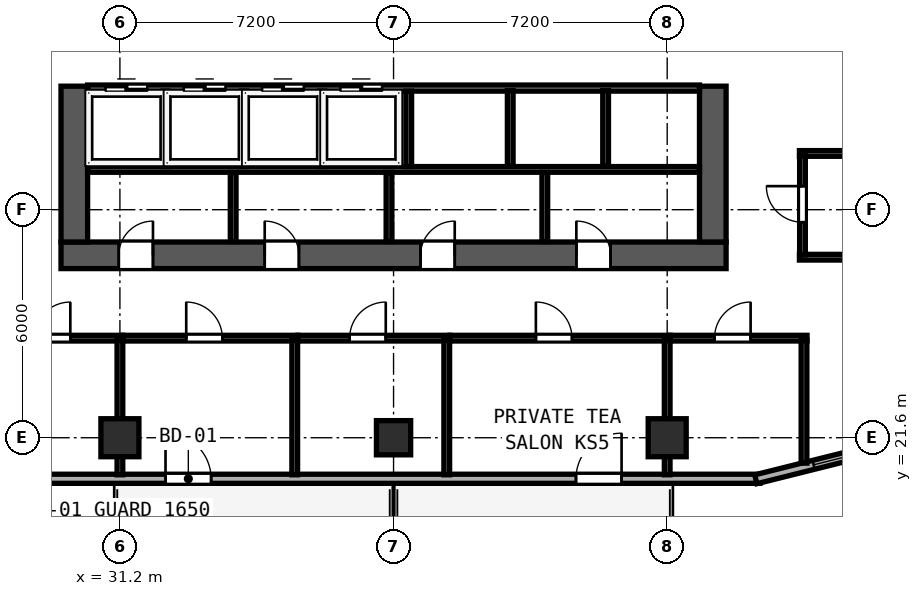
"""IFC4 building model, lengths in metres.
Left out: names, types, materials, properties, quantities, classifications, styles, units other than length and angle.
Written with IfcOpenShell. Run it as: python <this file> out.ifc"""

import sys

from ifc_helpers import new_model, si_unit, direction, frame, frame_2d, origin, origin_2d, place, context, subcontext, project, spatial, rectangle, hollow_rectangle, extrude, element, fill, save


model = new_model("IFC4")
c1 = context("Model", 3, precision=1e-05, world=origin(), true_north=direction((0.0, 1.0)))
c2 = subcontext(c1, "Body", "Model", "MODEL_VIEW")
j1 = project(units=[si_unit("LENGTHUNIT", "METRE"), si_unit("PLANEANGLEUNIT", "RADIAN")], contexts=[c1])
p1 = place(None, origin())
s1 = spatial("IfcSite", under=j1, at=p1, CompositionType="ELEMENT")
p2 = place(p1, origin())
s2 = spatial("IfcBuilding", under=s1, at=p2, CompositionType="ELEMENT")
p3 = place(p2, frame((0.0, 0.0, 121.2)))
s3 = spatial("IfcBuildingStorey", under=s2, at=p3, CompositionType="ELEMENT", Elevation=121.2)
p4 = place(p3, frame((29.65, 26.4, 0.0), z_axis=(0.0, 0.0, 1.0), x_axis=(1.0, 0.0, 0.0)))
e1 = element("IfcWall", 1, at=p4, inside=s3, PredefinedType="SHEAR", context=c2, shape_type="SweptSolid", body=[
    extrude(rectangle(XDim=17.5, YDim=0.7, at=frame_2d((8.75, 0.0))), origin(), (0.0, 0.0, 1.0), 3.6),
])
p5 = place(p4, frame((2.42, 0.0, 0.0), z_axis=(0.0, 0.0, 1.0), x_axis=(-1.0, 0.0, 0.0)))
e2 = element("IfcOpeningElement", 2, at=p5, cuts=e1, PredefinedType="OPENING", context=c2, shape_type="SweptSolid", body=[
    extrude(rectangle(XDim=0.9, YDim=2.1, at=frame_2d((0.45, 1.05))), frame((0.0, 0.36, 0.0), z_axis=(0.0, -1.0, 0.0), x_axis=(1.0, 0.0, 0.0)), (0.0, 0.0, 1.0), 0.72),
])
p6 = place(p4, frame((6.26, 0.0, 0.0), z_axis=(0.0, 0.0, 1.0), x_axis=(-1.0, 0.0, 0.0)))
e3 = element("IfcOpeningElement", 3, at=p6, cuts=e1, PredefinedType="OPENING", context=c2, shape_type="SweptSolid", body=[
    extrude(rectangle(XDim=0.9, YDim=2.1, at=frame_2d((0.45, 1.05))), frame((0.0, 0.36, 0.0), z_axis=(0.0, -1.0, 0.0), x_axis=(1.0, 0.0, 0.0)), (0.0, 0.0, 1.0), 0.72),
])
p7 = place(p4, frame((10.36, 0.0, 0.0), z_axis=(0.0, 0.0, 1.0), x_axis=(-1.0, 0.0, 0.0)))
e4 = element("IfcOpeningElement", 4, at=p7, cuts=e1, PredefinedType="OPENING", context=c2, shape_type="SweptSolid", body=[
    extrude(rectangle(XDim=0.9, YDim=2.1, at=frame_2d((0.45, 1.05))), frame((0.0, 0.36, 0.0), z_axis=(0.0, -1.0, 0.0), x_axis=(1.0, 0.0, 0.0)), (0.0, 0.0, 1.0), 0.72),
])
p8 = place(p4, frame((14.46, 0.0, 0.0), z_axis=(0.0, 0.0, 1.0), x_axis=(-1.0, 0.0, 0.0)))
e5 = element("IfcOpeningElement", 5, at=p8, cuts=e1, PredefinedType="OPENING", context=c2, shape_type="SweptSolid", body=[
    extrude(rectangle(XDim=0.9, YDim=2.1, at=frame_2d((0.45, 1.05))), frame((0.0, 0.36, 0.0), z_axis=(0.0, -1.0, 0.0), x_axis=(1.0, 0.0, 0.0)), (0.0, 0.0, 1.0), 0.72),
])
for number, where, z_axis, x_axis in (
    (6, (30.0, 26.75, 0.0), (0.0, 0.0, 1.0), (0.0, 1.0, 0.0)),
    (7, (46.8, 26.75, 0.0), (0.0, 0.0, 1.0), (0.0, 1.0, 0.0)),
):
    element("IfcWall", number, at=place(p3, frame(where, z_axis=z_axis, x_axis=x_axis)), inside=s3, PredefinedType="SHEAR", context=c2, shape_type="SweptSolid", body=[
        extrude(rectangle(XDim=4.1, YDim=0.7, at=frame_2d((2.05, 0.0))), origin(), (0.0, 0.0, 1.0), 3.6),
    ])
for number, where, z_axis, x_axis in (
    (8, (31.2, 21.6, 0.0), (0.0, 0.0, 1.0), (1.0, 0.0, 0.0)),
    (9, (45.6, 21.6, 0.0), (0.0, 0.0, 1.0), (1.0, 0.0, 0.0)),
):
    element("IfcColumn", number, at=place(p3, frame(where, z_axis=z_axis, x_axis=x_axis)), inside=s3, PredefinedType="COLUMN", context=c2, shape_type="SweptSolid", body=[
        extrude(hollow_rectangle(XDim=1.0, YDim=1.0, WallThickness=0.038, at=origin_2d()), origin(), (0.0, 0.0, 1.0), 3.8),
    ])
p9 = place(p3, frame((38.4, 21.6, 0.0), z_axis=(0.0, 0.0, 1.0), x_axis=(1.0, 0.0, 0.0)))
e10 = element("IfcColumn", 10, at=p9, inside=s3, PredefinedType="COLUMN", context=c2, shape_type="SweptSolid", body=[
    extrude(hollow_rectangle(XDim=0.9, YDim=0.9, WallThickness=0.034, at=origin_2d()), origin(), (0.0, 0.0, 1.0), 3.8),
])
p10 = place(p3, frame((28.76, 20.52, 0.0), z_axis=(0.0, 0.0, 1.0), x_axis=(1.0, 0.0, 0.0)))
e11 = element("IfcWall", 11, at=p10, inside=s3, PredefinedType="SOLIDWALL", context=c2, shape_type="SweptSolid", body=[
    extrude(rectangle(XDim=19.281, YDim=0.24, at=frame_2d((9.64, 0.0))), origin(), (0.0, 0.0, 1.0), 3.6),
])
p11 = place(p10, frame((4.84, 0.0, 0.0), z_axis=(0.0, 0.0, 1.0), x_axis=(-1.0, 0.0, 0.0)))
e12 = element("IfcOpeningElement", 12, at=p11, cuts=e11, PredefinedType="OPENING", context=c2, shape_type="SweptSolid", body=[
    extrude(rectangle(XDim=1.2, YDim=2.15, at=frame_2d((0.6, 1.075))), frame((0.0, 0.13, 0.0), z_axis=(0.0, -1.0, 0.0), x_axis=(1.0, 0.0, 0.0)), (0.0, 0.0, 1.0), 0.26),
])
p12 = place(p10, frame((15.64, 0.0, 0.0), z_axis=(0.0, 0.0, 1.0), x_axis=(-1.0, 0.0, 0.0)))
e13 = element("IfcOpeningElement", 13, at=p12, cuts=e11, PredefinedType="OPENING", context=c2, shape_type="SweptSolid", body=[
    extrude(rectangle(XDim=1.2, YDim=2.15, at=frame_2d((0.6, 1.075))), frame((0.0, 0.13, 0.0), z_axis=(0.0, -1.0, 0.0), x_axis=(1.0, 0.0, 0.0)), (0.0, 0.0, 1.0), 0.26),
])
p13 = place(p3, frame((47.932, 20.507, 0.0), z_axis=(0.0, 0.0, 1.0), x_axis=(0.970145683738, 0.242522890311, 0.0)))
e14 = element("IfcWall", 14, at=p13, inside=s3, PredefinedType="SOLIDWALL", context=c2, shape_type="SweptSolid", body=[
    extrude(rectangle(XDim=4.511, YDim=0.24, at=frame_2d((2.255, 0.0))), origin(), (0.0, 0.0, 1.0), 3.145),
])
p14 = place(p13, frame((1.569, 0.0, 0.85)))
e15 = element("IfcOpeningElement", 15, at=p14, cuts=e14, PredefinedType="OPENING", context=c2, shape_type="SweptSolid", body=[
    extrude(rectangle(XDim=1.15, YDim=1.8, at=frame_2d((0.575, 0.9))), frame((0.0, 0.13, 0.0), z_axis=(0.0, -1.0, 0.0), x_axis=(1.0, 0.0, 0.0)), (0.0, 0.0, 1.0), 0.26),
])
p15 = place(p3, frame((30.35, 30.8, 0.0), z_axis=(0.0, 0.0, 1.0), x_axis=(1.0, 0.0, 0.0)))
e16 = element("IfcWall", 16, at=p15, inside=s3, PredefinedType="SOLIDWALL", context=c2, shape_type="SweptSolid", body=[
    extrude(rectangle(XDim=16.1, YDim=0.16, at=frame_2d((8.05, 0.0))), origin(), (0.0, 0.0, 1.0), 3.6),
])
p16 = place(p15, frame((0.47, 0.0, 0.0)))
e17 = element("IfcOpeningElement", 17, at=p16, cuts=e16, PredefinedType="OPENING", context=c2, shape_type="SweptSolid", body=[
    extrude(rectangle(XDim=1.1, YDim=2.2, at=frame_2d((0.55, 1.1))), frame((0.0, 0.09, 0.0), z_axis=(0.0, -1.0, 0.0), x_axis=(1.0, 0.0, 0.0)), (0.0, 0.0, 1.0), 0.18),
])
p17 = place(p15, frame((2.53, 0.0, 0.0)))
e18 = element("IfcOpeningElement", 18, at=p17, cuts=e16, PredefinedType="OPENING", context=c2, shape_type="SweptSolid", body=[
    extrude(rectangle(XDim=1.1, YDim=2.2, at=frame_2d((0.55, 1.1))), frame((0.0, 0.09, 0.0), z_axis=(0.0, -1.0, 0.0), x_axis=(1.0, 0.0, 0.0)), (0.0, 0.0, 1.0), 0.18),
])
p18 = place(p15, frame((4.59, 0.0, 0.0)))
e19 = element("IfcOpeningElement", 19, at=p18, cuts=e16, PredefinedType="OPENING", context=c2, shape_type="SweptSolid", body=[
    extrude(rectangle(XDim=1.1, YDim=2.2, at=frame_2d((0.55, 1.1))), frame((0.0, 0.09, 0.0), z_axis=(0.0, -1.0, 0.0), x_axis=(1.0, 0.0, 0.0)), (0.0, 0.0, 1.0), 0.18),
])
p19 = place(p15, frame((6.65, 0.0, 0.0)))
e20 = element("IfcOpeningElement", 20, at=p19, cuts=e16, PredefinedType="OPENING", context=c2, shape_type="SweptSolid", body=[
    extrude(rectangle(XDim=1.1, YDim=2.2, at=frame_2d((0.55, 1.1))), frame((0.0, 0.09, 0.0), z_axis=(0.0, -1.0, 0.0), x_axis=(1.0, 0.0, 0.0)), (0.0, 0.0, 1.0), 0.18),
])
p20 = place(p3, frame((30.35, 28.66, 0.0), z_axis=(0.0, 0.0, 1.0), x_axis=(1.0, 0.0, 0.0)))
e21 = element("IfcWall", 21, at=p20, inside=s3, PredefinedType="PARTITIONING", context=c2, shape_type="SweptSolid", body=[
    extrude(rectangle(XDim=16.1, YDim=0.15, at=frame_2d((8.05, 0.0))), origin(), (0.0, 0.0, 1.0), 3.6),
])
for number, where, z_axis, x_axis in (
    (22, (32.4, 28.735, 0.0), (0.0, 0.0, 1.0), (0.0, 1.0, 0.0)),
    (23, (34.46, 28.735, 0.0), (0.0, 0.0, 1.0), (0.0, 1.0, 0.0)),
    (24, (36.52, 28.735, 0.0), (0.0, 0.0, 1.0), (0.0, 1.0, 0.0)),
    (25, (38.8, 28.735, 0.0), (0.0, 0.0, 1.0), (0.0, 1.0, 0.0)),
):
    element("IfcWall", number, at=place(p3, frame(where, z_axis=z_axis, x_axis=x_axis)), inside=s3, PredefinedType="SOLIDWALL", context=c2, shape_type="SweptSolid", body=[
        extrude(rectangle(XDim=1.985, YDim=0.15, at=frame_2d((0.992, 0.0))), origin(), (0.0, 0.0, 1.0), 3.6),
    ])
for number, where, z_axis, x_axis in (
    (26, (34.18, 26.76, 0.0), (0.0, 0.0, 1.0), (0.0, 1.0, 0.0)),
    (27, (38.28, 26.76, 0.0), (0.0, 0.0, 1.0), (0.0, 1.0, 0.0)),
    (28, (42.38, 26.76, 0.0), (0.0, 0.0, 1.0), (0.0, 1.0, 0.0)),
):
    element("IfcWall", number, at=place(p3, frame(where, z_axis=z_axis, x_axis=x_axis)), inside=s3, PredefinedType="PARTITIONING", context=c2, shape_type="SweptSolid", body=[
        extrude(rectangle(XDim=1.82, YDim=0.15, at=frame_2d((0.91, 0.0))), origin(), (0.0, 0.0, 1.0), 3.6),
    ])
for number, where, z_axis, x_axis in (
    (29, (41.47, 28.75, 0.0), (0.0, 0.0, 1.0), (0.0, 1.0, 0.0)),
    (30, (43.98, 28.75, 0.0), (0.0, 0.0, 1.0), (0.0, 1.0, 0.0)),
):
    element("IfcWall", number, at=place(p3, frame(where, z_axis=z_axis, x_axis=x_axis)), inside=s3, PredefinedType="SOLIDWALL", context=c2, shape_type="SweptSolid", body=[
        extrude(rectangle(XDim=1.985, YDim=0.15, at=frame_2d((0.993, 0.0))), origin(), (0.0, 0.0, 1.0), 3.6),
    ])
for number, where, z_axis, x_axis in (
    (31, (49.08, 29.08, 0.0), (0.0, 0.0, 1.0), (1.0, 0.0, 0.0)),
    (32, (49.08, 26.35, 0.0), (0.0, 0.0, 1.0), (1.0, 0.0, 0.0)),
):
    element("IfcWall", number, at=place(p3, frame(where, z_axis=z_axis, x_axis=x_axis)), inside=s3, PredefinedType="PARTITIONING", context=c2, shape_type="SweptSolid", body=[
        extrude(rectangle(XDim=3.8, YDim=0.15, at=frame_2d((1.9, 0.0))), origin(), (0.0, 0.0, 1.0), 3.6),
    ])
p21 = place(p3, frame((49.16, 26.41, 0.0), z_axis=(0.0, 0.0, 1.0), x_axis=(0.0, 1.0, 0.0)))
e33 = element("IfcWall", 33, at=p21, inside=s3, PredefinedType="PARTITIONING", context=c2, shape_type="SweptSolid", body=[
    extrude(rectangle(XDim=2.61, YDim=0.15, at=frame_2d((1.305, 0.0))), origin(), (0.0, 0.0, 1.0), 3.6),
])
p22 = place(p21, frame((0.86, 0.0, 0.0)))
e34 = element("IfcOpeningElement", 34, at=p22, cuts=e33, PredefinedType="OPENING", context=c2, shape_type="SweptSolid", body=[
    extrude(rectangle(XDim=0.95, YDim=2.12, at=frame_2d((0.475, 1.06))), frame((0.0, 0.085, 0.0), z_axis=(0.0, -1.0, 0.0), x_axis=(1.0, 0.0, 0.0)), (0.0, 0.0, 1.0), 0.17),
])
p23 = place(p3, frame((27.72, 24.22, 0.0), z_axis=(0.0, 0.0, 1.0), x_axis=(1.0, 0.0, 0.0)))
e35 = element("IfcWall", 35, at=p23, inside=s3, PredefinedType="PARTITIONING", context=c2, shape_type="SweptSolid", body=[
    extrude(rectangle(XDim=3.56, YDim=0.15, at=frame_2d((1.78, 0.0))), origin(), (0.0, 0.0, 1.0), 3.6),
])
p24 = place(p23, frame((2.175, 0.0, 0.0), z_axis=(0.0, 0.0, 1.0), x_axis=(-1.0, 0.0, 0.0)))
e36 = element("IfcOpeningElement", 36, at=p24, cuts=e35, PredefinedType="OPENING", context=c2, shape_type="SweptSolid", body=[
    extrude(rectangle(XDim=0.95, YDim=2.12, at=frame_2d((0.475, 1.06))), frame((0.0, 0.085, 0.0), z_axis=(0.0, -1.0, 0.0), x_axis=(1.0, 0.0, 0.0)), (0.0, 0.0, 1.0), 0.17),
])
p25 = place(p3, frame((31.2, 20.625, 0.0), z_axis=(0.0, 0.0, 1.0), x_axis=(0.0, 1.0, 0.0)))
e37 = element("IfcWall", 37, at=p25, inside=s3, PredefinedType="PARTITIONING", context=c2, shape_type="SweptSolid", body=[
    extrude(rectangle(XDim=3.535, YDim=0.15, at=frame_2d((1.768, 0.0))), origin(), (0.0, 0.0, 1.0), 3.085),
])
p26 = place(p3, frame((31.282, 24.22, 0.0), z_axis=(0.0, 0.0, 1.0), x_axis=(1.0, 0.0, 0.0)))
e38 = element("IfcWall", 38, at=p26, inside=s3, PredefinedType="PARTITIONING", context=c2, shape_type="SweptSolid", body=[
    extrude(rectangle(XDim=4.598, YDim=0.15, at=frame_2d((2.299, 0.0))), origin(), (0.0, 0.0, 1.0), 3.6),
])
p27 = place(p26, frame((2.613, 0.0, 0.0), z_axis=(0.0, 0.0, 1.0), x_axis=(-1.0, 0.0, 0.0)))
e39 = element("IfcOpeningElement", 39, at=p27, cuts=e38, PredefinedType="OPENING", context=c2, shape_type="SweptSolid", body=[
    extrude(rectangle(XDim=0.95, YDim=2.12, at=frame_2d((0.475, 1.06))), frame((0.0, 0.085, 0.0), z_axis=(0.0, -1.0, 0.0), x_axis=(1.0, 0.0, 0.0)), (0.0, 0.0, 1.0), 0.17),
])
p28 = place(p3, frame((35.8, 20.625, 0.0), z_axis=(0.0, 0.0, 1.0), x_axis=(0.0, 1.0, 0.0)))
e40 = element("IfcWall", 40, at=p28, inside=s3, PredefinedType="PARTITIONING", context=c2, shape_type="SweptSolid", body=[
    extrude(rectangle(XDim=3.535, YDim=0.15, at=frame_2d((1.768, 0.0))), origin(), (0.0, 0.0, 1.0), 3.6),
])
p29 = place(p3, frame((35.882, 24.22, 0.0), z_axis=(0.0, 0.0, 1.0), x_axis=(1.0, 0.0, 0.0)))
e41 = element("IfcWall", 41, at=p29, inside=s3, PredefinedType="PARTITIONING", context=c2, shape_type="SweptSolid", body=[
    extrude(rectangle(XDim=3.998, YDim=0.15, at=frame_2d((1.999, 0.0))), origin(), (0.0, 0.0, 1.0), 3.6),
])
p30 = place(p29, frame((2.313, 0.0, 0.0), z_axis=(0.0, 0.0, 1.0), x_axis=(-1.0, 0.0, 0.0)))
e42 = element("IfcOpeningElement", 42, at=p30, cuts=e41, PredefinedType="OPENING", context=c2, shape_type="SweptSolid", body=[
    extrude(rectangle(XDim=0.95, YDim=2.12, at=frame_2d((0.475, 1.06))), frame((0.0, 0.085, 0.0), z_axis=(0.0, -1.0, 0.0), x_axis=(1.0, 0.0, 0.0)), (0.0, 0.0, 1.0), 0.17),
])
p31 = place(p3, frame((39.8, 20.625, 0.0), z_axis=(0.0, 0.0, 1.0), x_axis=(0.0, 1.0, 0.0)))
e43 = element("IfcWall", 43, at=p31, inside=s3, PredefinedType="PARTITIONING", context=c2, shape_type="SweptSolid", body=[
    extrude(rectangle(XDim=3.535, YDim=0.15, at=frame_2d((1.768, 0.0))), origin(), (0.0, 0.0, 1.0), 3.6),
])
p32 = place(p3, frame((39.882, 24.22, 0.0), z_axis=(0.0, 0.0, 1.0), x_axis=(1.0, 0.0, 0.0)))
e44 = element("IfcWall", 44, at=p32, inside=s3, PredefinedType="PARTITIONING", context=c2, shape_type="SweptSolid", body=[
    extrude(rectangle(XDim=5.798, YDim=0.15, at=frame_2d((2.899, 0.0))), origin(), (0.0, 0.0, 1.0), 3.6),
])
p33 = place(p32, frame((3.213, 0.0, 0.0), z_axis=(0.0, 0.0, 1.0), x_axis=(-1.0, 0.0, 0.0)))
e45 = element("IfcOpeningElement", 45, at=p33, cuts=e44, PredefinedType="OPENING", context=c2, shape_type="SweptSolid", body=[
    extrude(rectangle(XDim=0.95, YDim=2.12, at=frame_2d((0.475, 1.06))), frame((0.0, 0.085, 0.0), z_axis=(0.0, -1.0, 0.0), x_axis=(1.0, 0.0, 0.0)), (0.0, 0.0, 1.0), 0.17),
])
p34 = place(p3, frame((45.6, 20.625, 0.0), z_axis=(0.0, 0.0, 1.0), x_axis=(0.0, 1.0, 0.0)))
e46 = element("IfcWall", 46, at=p34, inside=s3, PredefinedType="PARTITIONING", context=c2, shape_type="SweptSolid", body=[
    extrude(rectangle(XDim=3.535, YDim=0.15, at=frame_2d((1.768, 0.0))), origin(), (0.0, 0.0, 1.0), 3.085),
])
p35 = place(p3, frame((45.682, 24.22, 0.0), z_axis=(0.0, 0.0, 1.0), x_axis=(1.0, 0.0, 0.0)))
e47 = element("IfcWall", 47, at=p35, inside=s3, PredefinedType="PARTITIONING", context=c2, shape_type="SweptSolid", body=[
    extrude(rectangle(XDim=3.598, YDim=0.15, at=frame_2d((1.799, 0.0))), origin(), (0.0, 0.0, 1.0), 3.6),
])
p36 = place(p35, frame((2.113, 0.0, 0.0), z_axis=(0.0, 0.0, 1.0), x_axis=(-1.0, 0.0, 0.0)))
e48 = element("IfcOpeningElement", 48, at=p36, cuts=e47, PredefinedType="OPENING", context=c2, shape_type="SweptSolid", body=[
    extrude(rectangle(XDim=0.95, YDim=2.12, at=frame_2d((0.475, 1.06))), frame((0.0, 0.085, 0.0), z_axis=(0.0, -1.0, 0.0), x_axis=(1.0, 0.0, 0.0)), (0.0, 0.0, 1.0), 0.17),
])
p37 = place(p3, frame((49.2, 20.932, 0.0), z_axis=(0.0, 0.0, 1.0), x_axis=(0.0, 1.0, 0.0)))
e49 = element("IfcWall", 49, at=p37, inside=s3, PredefinedType="PARTITIONING", context=c2, shape_type="SweptSolid", body=[
    extrude(rectangle(XDim=3.228, YDim=0.15, at=frame_2d((1.614, 0.0))), origin(), (0.0, 0.0, 1.0), 3.6),
])
p38 = place(p14, origin())
e50 = element("IfcWindow", 50, at=p38, inside=s3, PartitioningType="SINGLE_PANEL", PredefinedType="WINDOW", context=c2, shape_type="SweptSolid", body=[
    extrude(rectangle(XDim=1.15, YDim=1.8, at=frame_2d((0.575, 0.9))), frame((0.0, 0.03, 0.0), z_axis=(0.0, -1.0, 0.0), x_axis=(1.0, 0.0, 0.0)), (0.0, 0.0, 1.0), 0.06),
])
fill(e15, e50)
p39 = place(p11, origin())
e51 = element("IfcDoor", 51, at=p39, inside=s3, OperationType="SINGLE_SWING_RIGHT", PredefinedType="DOOR", context=c2, shape_type="SweptSolid", body=[
    extrude(rectangle(XDim=1.2, YDim=2.15, at=frame_2d((0.6, 1.075))), frame((0.0, 0.025, 0.0), z_axis=(0.0, -1.0, 0.0), x_axis=(1.0, 0.0, 0.0)), (0.0, 0.0, 1.0), 0.05),
])
fill(e12, e51)
p40 = place(p12, origin())
e52 = element("IfcDoor", 52, at=p40, inside=s3, OperationType="SINGLE_SWING_LEFT", PredefinedType="DOOR", context=c2, shape_type="SweptSolid", body=[
    extrude(rectangle(XDim=1.2, YDim=2.15, at=frame_2d((0.6, 1.075))), frame((0.0, 0.025, 0.0), z_axis=(0.0, -1.0, 0.0), x_axis=(1.0, 0.0, 0.0)), (0.0, 0.0, 1.0), 0.05),
])
fill(e13, e52)
p41 = place(p16, origin())
e53 = element("IfcDoor", 53, at=p41, inside=s3, OperationType="SLIDING_TO_LEFT", PredefinedType="DOOR", context=c2, shape_type="SweptSolid", body=[
    extrude(rectangle(XDim=1.1, YDim=2.2, at=frame_2d((0.55, 1.1))), frame((0.0, 0.025, 0.0), z_axis=(0.0, -1.0, 0.0), x_axis=(1.0, 0.0, 0.0)), (0.0, 0.0, 1.0), 0.05),
])
fill(e17, e53)
p42 = place(p17, origin())
e54 = element("IfcDoor", 54, at=p42, inside=s3, OperationType="SLIDING_TO_LEFT", PredefinedType="DOOR", context=c2, shape_type="SweptSolid", body=[
    extrude(rectangle(XDim=1.1, YDim=2.2, at=frame_2d((0.55, 1.1))), frame((0.0, 0.025, 0.0), z_axis=(0.0, -1.0, 0.0), x_axis=(1.0, 0.0, 0.0)), (0.0, 0.0, 1.0), 0.05),
])
fill(e18, e54)
p43 = place(p18, origin())
e55 = element("IfcDoor", 55, at=p43, inside=s3, OperationType="SLIDING_TO_LEFT", PredefinedType="DOOR", context=c2, shape_type="SweptSolid", body=[
    extrude(rectangle(XDim=1.1, YDim=2.2, at=frame_2d((0.55, 1.1))), frame((0.0, 0.025, 0.0), z_axis=(0.0, -1.0, 0.0), x_axis=(1.0, 0.0, 0.0)), (0.0, 0.0, 1.0), 0.05),
])
fill(e19, e55)
p44 = place(p19, origin())
e56 = element("IfcDoor", 56, at=p44, inside=s3, OperationType="SLIDING_TO_LEFT", PredefinedType="DOOR", context=c2, shape_type="SweptSolid", body=[
    extrude(rectangle(XDim=1.1, YDim=2.2, at=frame_2d((0.55, 1.1))), frame((0.0, 0.025, 0.0), z_axis=(0.0, -1.0, 0.0), x_axis=(1.0, 0.0, 0.0)), (0.0, 0.0, 1.0), 0.05),
])
fill(e20, e56)
p45 = place(p5, origin())
e57 = element("IfcDoor", 57, at=p45, inside=s3, OperationType="SINGLE_SWING_LEFT", PredefinedType="DOOR", context=c2, shape_type="SweptSolid", body=[
    extrude(rectangle(XDim=0.9, YDim=2.1, at=frame_2d((0.45, 1.05))), frame((0.0, -0.195, 0.0), z_axis=(0.0, -1.0, 0.0), x_axis=(1.0, 0.0, 0.0)), (0.0, 0.0, 1.0), 0.05),
])
fill(e2, e57)
p46 = place(p6, origin())
e58 = element("IfcDoor", 58, at=p46, inside=s3, OperationType="SINGLE_SWING_RIGHT", PredefinedType="DOOR", context=c2, shape_type="SweptSolid", body=[
    extrude(rectangle(XDim=0.9, YDim=2.1, at=frame_2d((0.45, 1.05))), frame((0.0, -0.195, 0.0), z_axis=(0.0, -1.0, 0.0), x_axis=(1.0, 0.0, 0.0)), (0.0, 0.0, 1.0), 0.05),
])
fill(e3, e58)
p47 = place(p7, origin())
e59 = element("IfcDoor", 59, at=p47, inside=s3, OperationType="SINGLE_SWING_LEFT", PredefinedType="DOOR", context=c2, shape_type="SweptSolid", body=[
    extrude(rectangle(XDim=0.9, YDim=2.1, at=frame_2d((0.45, 1.05))), frame((0.0, -0.195, 0.0), z_axis=(0.0, -1.0, 0.0), x_axis=(1.0, 0.0, 0.0)), (0.0, 0.0, 1.0), 0.05),
])
fill(e4, e59)
p48 = place(p8, origin())
e60 = element("IfcDoor", 60, at=p48, inside=s3, OperationType="SINGLE_SWING_RIGHT", PredefinedType="DOOR", context=c2, shape_type="SweptSolid", body=[
    extrude(rectangle(XDim=0.9, YDim=2.1, at=frame_2d((0.45, 1.05))), frame((0.0, -0.195, 0.0), z_axis=(0.0, -1.0, 0.0), x_axis=(1.0, 0.0, 0.0)), (0.0, 0.0, 1.0), 0.05),
])
fill(e5, e60)
p49 = place(p22, origin())
e61 = element("IfcDoor", 61, at=p49, inside=s3, OperationType="SINGLE_SWING_RIGHT", PredefinedType="DOOR", context=c2, shape_type="SweptSolid", body=[
    extrude(rectangle(XDim=0.95, YDim=2.12, at=frame_2d((0.475, 1.06))), frame((0.0, 0.025, 0.0), z_axis=(0.0, -1.0, 0.0), x_axis=(1.0, 0.0, 0.0)), (0.0, 0.0, 1.0), 0.05),
])
fill(e34, e61)
p50 = place(p24, origin())
e62 = element("IfcDoor", 62, at=p50, inside=s3, OperationType="SINGLE_SWING_LEFT", PredefinedType="DOOR", context=c2, shape_type="SweptSolid", body=[
    extrude(rectangle(XDim=0.95, YDim=2.12, at=frame_2d((0.475, 1.06))), frame((0.0, 0.025, 0.0), z_axis=(0.0, -1.0, 0.0), x_axis=(1.0, 0.0, 0.0)), (0.0, 0.0, 1.0), 0.05),
])
fill(e36, e62)
p51 = place(p27, origin())
e63 = element("IfcDoor", 63, at=p51, inside=s3, OperationType="SINGLE_SWING_RIGHT", PredefinedType="DOOR", context=c2, shape_type="SweptSolid", body=[
    extrude(rectangle(XDim=0.95, YDim=2.12, at=frame_2d((0.475, 1.06))), frame((0.0, 0.025, 0.0), z_axis=(0.0, -1.0, 0.0), x_axis=(1.0, 0.0, 0.0)), (0.0, 0.0, 1.0), 0.05),
])
fill(e39, e63)
p52 = place(p30, origin())
e64 = element("IfcDoor", 64, at=p52, inside=s3, OperationType="SINGLE_SWING_LEFT", PredefinedType="DOOR", context=c2, shape_type="SweptSolid", body=[
    extrude(rectangle(XDim=0.95, YDim=2.12, at=frame_2d((0.475, 1.06))), frame((0.0, 0.025, 0.0), z_axis=(0.0, -1.0, 0.0), x_axis=(1.0, 0.0, 0.0)), (0.0, 0.0, 1.0), 0.05),
])
fill(e42, e64)
p53 = place(p33, origin())
e65 = element("IfcDoor", 65, at=p53, inside=s3, OperationType="SINGLE_SWING_RIGHT", PredefinedType="DOOR", context=c2, shape_type="SweptSolid", body=[
    extrude(rectangle(XDim=0.95, YDim=2.12, at=frame_2d((0.475, 1.06))), frame((0.0, 0.025, 0.0), z_axis=(0.0, -1.0, 0.0), x_axis=(1.0, 0.0, 0.0)), (0.0, 0.0, 1.0), 0.05),
])
fill(e45, e65)
p54 = place(p36, origin())
e66 = element("IfcDoor", 66, at=p54, inside=s3, OperationType="SINGLE_SWING_LEFT", PredefinedType="DOOR", context=c2, shape_type="SweptSolid", body=[
    extrude(rectangle(XDim=0.95, YDim=2.12, at=frame_2d((0.475, 1.06))), frame((0.0, 0.025, 0.0), z_axis=(0.0, -1.0, 0.0), x_axis=(1.0, 0.0, 0.0)), (0.0, 0.0, 1.0), 0.05),
])
fill(e48, e66)
save(model, sys.argv[1])
